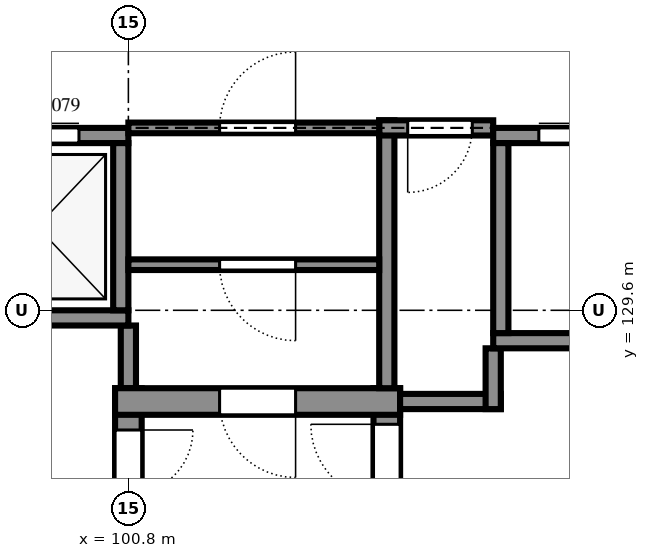
"""IFC4 building model, lengths in metres.
Left out: names, types, materials, properties, quantities, classifications, styles, units other than length and angle.
Written with IfcOpenShell. Run it as: python <this file> out.ifc"""

import sys

from ifc_helpers import new_model, si_unit, direction, frame, frame_2d, origin, place, context, subcontext, project, spatial, rectangle, extrude, element, fill, save


model = new_model("IFC4")
c1 = context("Model", 3, precision=1e-05, world=origin(), true_north=direction((0.0, 1.0)))
c2 = subcontext(c1, "Body", "Model", "MODEL_VIEW")
j1 = project(units=[si_unit("LENGTHUNIT", "METRE"), si_unit("PLANEANGLEUNIT", "RADIAN")], contexts=[c1])
p1 = place(None, origin())
s1 = spatial("IfcSite", under=j1, at=p1, CompositionType="ELEMENT")
p2 = place(p1, origin())
s2 = spatial("IfcBuilding", under=s1, at=p2, CompositionType="ELEMENT")
p3 = place(p2, frame((0.0, 0.0, 7.2)))
s3 = spatial("IfcBuildingStorey", under=s2, at=p3, CompositionType="ELEMENT", Elevation=7.2)
p4 = place(p3, frame((104.2, 125.1, 0.0), z_axis=(0.0, 0.0, 1.0), x_axis=(0.0, 1.0, 0.0)))
e1 = element("IfcWall", 1, at=p4, inside=s3, PredefinedType="SHEAR", context=c2, shape_type="SweptSolid", body=[
    extrude(rectangle(XDim=3.475, YDim=0.35, at=frame_2d((1.737, 0.0))), origin(), (0.0, 0.0, 1.0), 3.6),
])
p5 = place(p4, frame((2.0, 0.0, 0.0)))
e2 = element("IfcOpeningElement", 2, at=p5, cuts=e1, PredefinedType="OPENING", context=c2, shape_type="SweptSolid", body=[
    extrude(rectangle(XDim=1.0, YDim=2.1, at=frame_2d((0.5, 1.05))), frame((0.0, 0.185, 0.0), z_axis=(0.0, -1.0, 0.0), x_axis=(1.0, 0.0, 0.0)), (0.0, 0.0, 1.0), 0.37),
])
p6 = place(p3, frame((100.8, 128.575, 0.0), z_axis=(0.0, 0.0, 1.0), x_axis=(0.0, -1.0, 0.0)))
e3 = element("IfcWall", 3, at=p6, inside=s3, PredefinedType="SHEAR", context=c2, shape_type="SweptSolid", body=[
    extrude(rectangle(XDim=6.35, YDim=0.35, at=frame_2d((3.175, 0.0))), origin(), (0.0, 0.0, 1.0), 3.6),
])
p7 = place(p6, frame((0.55, 0.0, 0.0)))
e4 = element("IfcOpeningElement", 4, at=p7, cuts=e3, PredefinedType="OPENING", context=c2, shape_type="SweptSolid", body=[
    extrude(rectangle(XDim=0.85, YDim=2.1, at=frame_2d((0.425, 1.05))), frame((0.0, 0.185, 0.0), z_axis=(0.0, -1.0, 0.0), x_axis=(1.0, 0.0, 0.0)), (0.0, 0.0, 1.0), 0.37),
])
p8 = place(p3, frame((100.8, 128.575, 0.0), z_axis=(0.0, 0.0, 1.0), x_axis=(0.0, 1.0, 0.0)))
e5 = element("IfcWall", 5, at=p8, inside=s3, PredefinedType="SHEAR", context=c2, shape_type="SweptSolid", body=[
    extrude(rectangle(XDim=0.825, YDim=0.2, at=frame_2d((0.413, 0.0))), origin(), (0.0, 0.0, 1.0), 3.6),
])
p9 = place(p3, frame((104.375, 128.4, 0.0), z_axis=(0.0, 0.0, 1.0), x_axis=(-1.0, 0.0, 0.0)))
e6 = element("IfcWall", 6, at=p9, inside=s3, PredefinedType="SHEAR", context=c2, shape_type="SweptSolid", body=[
    extrude(rectangle(XDim=3.75, YDim=0.35, at=frame_2d((1.875, 0.0))), origin(), (0.0, 0.0, 1.0), 3.6),
])
p10 = place(p9, frame((1.375, 0.0, 0.0)))
e7 = element("IfcOpeningElement", 7, at=p10, cuts=e6, PredefinedType="OPENING", context=c2, shape_type="SweptSolid", body=[
    extrude(rectangle(XDim=1.0, YDim=2.1, at=frame_2d((0.5, 1.05))), frame((0.0, 0.185, 0.0), z_axis=(0.0, -1.0, 0.0), x_axis=(1.0, 0.0, 0.0)), (0.0, 0.0, 1.0), 0.37),
])
p11 = place(p3, frame((104.375, 128.4, 0.0), z_axis=(0.0, 0.0, 1.0), x_axis=(1.0, 0.0, 0.0)))
e8 = element("IfcWall", 8, at=p11, inside=s3, PredefinedType="SHEAR", context=c2, shape_type="SweptSolid", body=[
    extrude(rectangle(XDim=1.325, YDim=0.2, at=frame_2d((0.663, 0.0))), origin(), (0.0, 0.0, 1.0), 3.6),
])
p12 = place(p3, frame((105.6, 128.3, 0.0), z_axis=(0.0, 0.0, 1.0), x_axis=(0.0, 1.0, 0.0)))
e9 = element("IfcWall", 9, at=p12, inside=s3, PredefinedType="SHEAR", context=c2, shape_type="SweptSolid", body=[
    extrude(rectangle(XDim=0.8, YDim=0.2, at=frame_2d((0.4, 0.0))), origin(), (0.0, 0.0, 1.0), 3.6),
])
p13 = place(p3, frame((104.2, 132.1, 0.0), z_axis=(0.0, 0.0, 1.0), x_axis=(0.0, -1.0, 0.0)))
e10 = element("IfcWall", 10, at=p13, inside=s3, PredefinedType="SHEAR", context=c2, shape_type="SweptSolid", body=[
    extrude(rectangle(XDim=3.525, YDim=0.2, at=frame_2d((1.763, 0.0))), origin(), (0.0, 0.0, 1.0), 3.6),
])
p14 = place(p3, frame((105.6, 132.0, 0.0), z_axis=(0.0, 0.0, 1.0), x_axis=(-1.0, 0.0, 0.0)))
e11 = element("IfcWall", 11, at=p14, inside=s3, PredefinedType="SHEAR", context=c2, shape_type="SweptSolid", body=[
    extrude(rectangle(XDim=1.5, YDim=0.2, at=frame_2d((0.75, 0.0))), origin(), (0.0, 0.0, 1.0), 3.6),
])
p15 = place(p14, frame((0.275, 0.0, 0.0)))
e12 = element("IfcOpeningElement", 12, at=p15, cuts=e11, PredefinedType="OPENING", context=c2, shape_type="SweptSolid", body=[
    extrude(rectangle(XDim=0.85, YDim=2.1, at=frame_2d((0.425, 1.05))), frame((0.0, 0.11, 0.0), z_axis=(0.0, -1.0, 0.0), x_axis=(1.0, 0.0, 0.0)), (0.0, 0.0, 1.0), 0.22),
])
p16 = place(p3, frame((98.4, 129.5, 0.0), z_axis=(0.0, 0.0, 1.0), x_axis=(1.0, 0.0, 0.0)))
e13 = element("IfcWall", 13, at=p16, inside=s3, PredefinedType="SHEAR", context=c2, shape_type="SweptSolid", body=[
    extrude(rectangle(XDim=2.4, YDim=0.2, at=frame_2d((1.2, 0.0))), origin(), (0.0, 0.0, 1.0), 3.6),
])
p17 = place(p3, frame((98.4, 131.9, 0.0), z_axis=(0.0, 0.0, 1.0), x_axis=(1.0, 0.0, 0.0)))
e14 = element("IfcWall", 14, at=p17, inside=s3, PredefinedType="SHEAR", context=c2, shape_type="SweptSolid", body=[
    extrude(rectangle(XDim=2.4, YDim=0.2, at=frame_2d((1.2, 0.0))), origin(), (0.0, 0.0, 1.0), 3.6),
])
p18 = place(p17, frame((0.65, 0.0, 0.0)))
e15 = element("IfcOpeningElement", 15, at=p18, cuts=e14, PredefinedType="OPENING", context=c2, shape_type="SweptSolid", body=[
    extrude(rectangle(XDim=1.1, YDim=2.1, at=frame_2d((0.55, 1.05))), frame((0.0, 0.11, 0.0), z_axis=(0.0, -1.0, 0.0), x_axis=(1.0, 0.0, 0.0)), (0.0, 0.0, 1.0), 0.22),
])
p19 = place(p3, frame((100.7, 129.6, 0.0), z_axis=(0.0, 0.0, 1.0), x_axis=(0.0, 1.0, 0.0)))
e16 = element("IfcWall", 16, at=p19, inside=s3, PredefinedType="SHEAR", context=c2, shape_type="SweptSolid", body=[
    extrude(rectangle(XDim=2.2, YDim=0.2, at=frame_2d((1.1, 0.0))), origin(), (0.0, 0.0, 1.0), 3.6),
])
p20 = place(p3, frame((105.6, 129.2, 0.0), z_axis=(0.0, 0.0, 1.0), x_axis=(1.0, 0.0, 0.0)))
e17 = element("IfcWall", 17, at=p20, inside=s3, PredefinedType="SHEAR", context=c2, shape_type="SweptSolid", body=[
    extrude(rectangle(XDim=2.4, YDim=0.2, at=frame_2d((1.2, 0.0))), origin(), (0.0, 0.0, 1.0), 3.6),
])
p21 = place(p3, frame((105.6, 131.9, 0.0), z_axis=(0.0, 0.0, 1.0), x_axis=(1.0, 0.0, 0.0)))
e18 = element("IfcWall", 18, at=p21, inside=s3, PredefinedType="SHEAR", context=c2, shape_type="SweptSolid", body=[
    extrude(rectangle(XDim=2.4, YDim=0.2, at=frame_2d((1.2, 0.0))), origin(), (0.0, 0.0, 1.0), 3.6),
])
p22 = place(p21, frame((0.6, 0.0, 0.0)))
e19 = element("IfcOpeningElement", 19, at=p22, cuts=e18, PredefinedType="OPENING", context=c2, shape_type="SweptSolid", body=[
    extrude(rectangle(XDim=1.2, YDim=2.1, at=frame_2d((0.6, 1.05))), frame((0.0, 0.11, 0.0), z_axis=(0.0, -1.0, 0.0), x_axis=(1.0, 0.0, 0.0)), (0.0, 0.0, 1.0), 0.22),
])
p23 = place(p3, frame((105.7, 129.3, 0.0), z_axis=(0.0, 0.0, 1.0), x_axis=(0.0, 1.0, 0.0)))
e20 = element("IfcWall", 20, at=p23, inside=s3, PredefinedType="SHEAR", context=c2, shape_type="SweptSolid", body=[
    extrude(rectangle(XDim=2.5, YDim=0.2, at=frame_2d((1.25, 0.0))), origin(), (0.0, 0.0, 1.0), 3.6),
])
p24 = place(p3, frame((100.8, 130.2, 0.0), z_axis=(0.0, 0.0, 1.0), x_axis=(1.0, 0.0, 0.0)))
e21 = element("IfcWall", 21, at=p24, inside=s3, PredefinedType="PARTITIONING", context=c2, shape_type="SweptSolid", body=[
    extrude(rectangle(XDim=3.3, YDim=0.14, at=frame_2d((1.65, 0.0))), origin(), (0.0, 0.0, 1.0), 3.42),
])
p25 = place(p24, frame((1.2, 0.0, 0.0)))
e22 = element("IfcOpeningElement", 22, at=p25, cuts=e21, PredefinedType="OPENING", context=c2, shape_type="SweptSolid", body=[
    extrude(rectangle(XDim=1.0, YDim=2.1, at=frame_2d((0.5, 1.05))), frame((0.0, 0.08, 0.0), z_axis=(0.0, -1.0, 0.0), x_axis=(1.0, 0.0, 0.0)), (0.0, 0.0, 1.0), 0.16),
])
p26 = place(p3, frame((100.8, 132.0, 0.0), z_axis=(0.0, 0.0, 1.0), x_axis=(1.0, 0.0, 0.0)))
e23 = element("IfcWall", 23, at=p26, inside=s3, PredefinedType="PARTITIONING", context=c2, shape_type="SweptSolid", body=[
    extrude(rectangle(XDim=3.3, YDim=0.14, at=frame_2d((1.65, 0.0))), origin(), (0.0, 0.0, 1.0), 3.42),
])
p27 = place(p26, frame((1.2, 0.0, 0.0)))
e24 = element("IfcOpeningElement", 24, at=p27, cuts=e23, PredefinedType="OPENING", context=c2, shape_type="SweptSolid", body=[
    extrude(rectangle(XDim=1.0, YDim=2.1, at=frame_2d((0.5, 1.05))), frame((0.0, 0.08, 0.0), z_axis=(0.0, -1.0, 0.0), x_axis=(1.0, 0.0, 0.0)), (0.0, 0.0, 1.0), 0.16),
])
p28 = place(p18, origin())
e25 = element("IfcDoor", 25, at=p28, inside=s3, OperationType="SLIDING_TO_LEFT", PredefinedType="DOOR", context=c2, shape_type="SweptSolid", body=[
    extrude(rectangle(XDim=1.1, YDim=2.1, at=frame_2d((0.55, 1.05))), frame((0.0, 0.025, 0.0), z_axis=(0.0, -1.0, 0.0), x_axis=(1.0, 0.0, 0.0)), (0.0, 0.0, 1.0), 0.05),
])
fill(e15, e25)
p29 = place(p22, origin())
e26 = element("IfcDoor", 26, at=p29, inside=s3, OperationType="SLIDING_TO_LEFT", PredefinedType="DOOR", context=c2, shape_type="SweptSolid", body=[
    extrude(rectangle(XDim=1.2, YDim=2.1, at=frame_2d((0.6, 1.05))), frame((0.0, 0.025, 0.0), z_axis=(0.0, -1.0, 0.0), x_axis=(1.0, 0.0, 0.0)), (0.0, 0.0, 1.0), 0.05),
])
fill(e19, e26)
p30 = place(p25, frame((1.0, 0.0, 0.0), z_axis=(0.0, 0.0, 1.0), x_axis=(-1.0, 0.0, 0.0)))
e27 = element("IfcDoor", 27, at=p30, inside=s3, OperationType="SINGLE_SWING_RIGHT", PredefinedType="DOOR", context=c2, shape_type="SweptSolid", body=[
    extrude(rectangle(XDim=1.0, YDim=2.1, at=frame_2d((0.5, 1.05))), frame((0.0, 0.025, 0.0), z_axis=(0.0, -1.0, 0.0), x_axis=(1.0, 0.0, 0.0)), (0.0, 0.0, 1.0), 0.05),
])
fill(e22, e27)
p31 = place(p27, origin())
e28 = element("IfcDoor", 28, at=p31, inside=s3, OperationType="SINGLE_SWING_LEFT", PredefinedType="DOOR", context=c2, shape_type="SweptSolid", body=[
    extrude(rectangle(XDim=1.0, YDim=2.1, at=frame_2d((0.5, 1.05))), frame((0.0, 0.025, 0.0), z_axis=(0.0, -1.0, 0.0), x_axis=(1.0, 0.0, 0.0)), (0.0, 0.0, 1.0), 0.05),
])
fill(e24, e28)
p32 = place(p10, origin())
e29 = element("IfcDoor", 29, at=p32, inside=s3, OperationType="SINGLE_SWING_RIGHT", PredefinedType="DOOR", context=c2, shape_type="SweptSolid", body=[
    extrude(rectangle(XDim=1.0, YDim=2.1, at=frame_2d((0.5, 1.05))), frame((0.0, 0.025, 0.0), z_axis=(0.0, -1.0, 0.0), x_axis=(1.0, 0.0, 0.0)), (0.0, 0.0, 1.0), 0.05),
])
fill(e7, e29)
p33 = place(p7, origin())
e30 = element("IfcDoor", 30, at=p33, inside=s3, OperationType="SINGLE_SWING_RIGHT", PredefinedType="DOOR", context=c2, shape_type="SweptSolid", body=[
    extrude(rectangle(XDim=0.85, YDim=2.1, at=frame_2d((0.425, 1.05))), frame((0.0, 0.025, 0.0), z_axis=(0.0, -1.0, 0.0), x_axis=(1.0, 0.0, 0.0)), (0.0, 0.0, 1.0), 0.05),
])
fill(e4, e30)
p34 = place(p5, origin())
e31 = element("IfcDoor", 31, at=p34, inside=s3, OperationType="SINGLE_SWING_LEFT", PredefinedType="DOOR", context=c2, shape_type="SweptSolid", body=[
    extrude(rectangle(XDim=1.0, YDim=2.1, at=frame_2d((0.5, 1.05))), frame((0.0, 0.025, 0.0), z_axis=(0.0, -1.0, 0.0), x_axis=(1.0, 0.0, 0.0)), (0.0, 0.0, 1.0), 0.05),
])
fill(e2, e31)
p35 = place(p15, origin())
e32 = element("IfcDoor", 32, at=p35, inside=s3, OperationType="SINGLE_SWING_LEFT", PredefinedType="DOOR", context=c2, shape_type="SweptSolid", body=[
    extrude(rectangle(XDim=0.85, YDim=2.1, at=frame_2d((0.425, 1.05))), frame((0.0, 0.025, 0.0), z_axis=(0.0, -1.0, 0.0), x_axis=(1.0, 0.0, 0.0)), (0.0, 0.0, 1.0), 0.05),
])
fill(e12, e32)
save(model, sys.argv[1])
